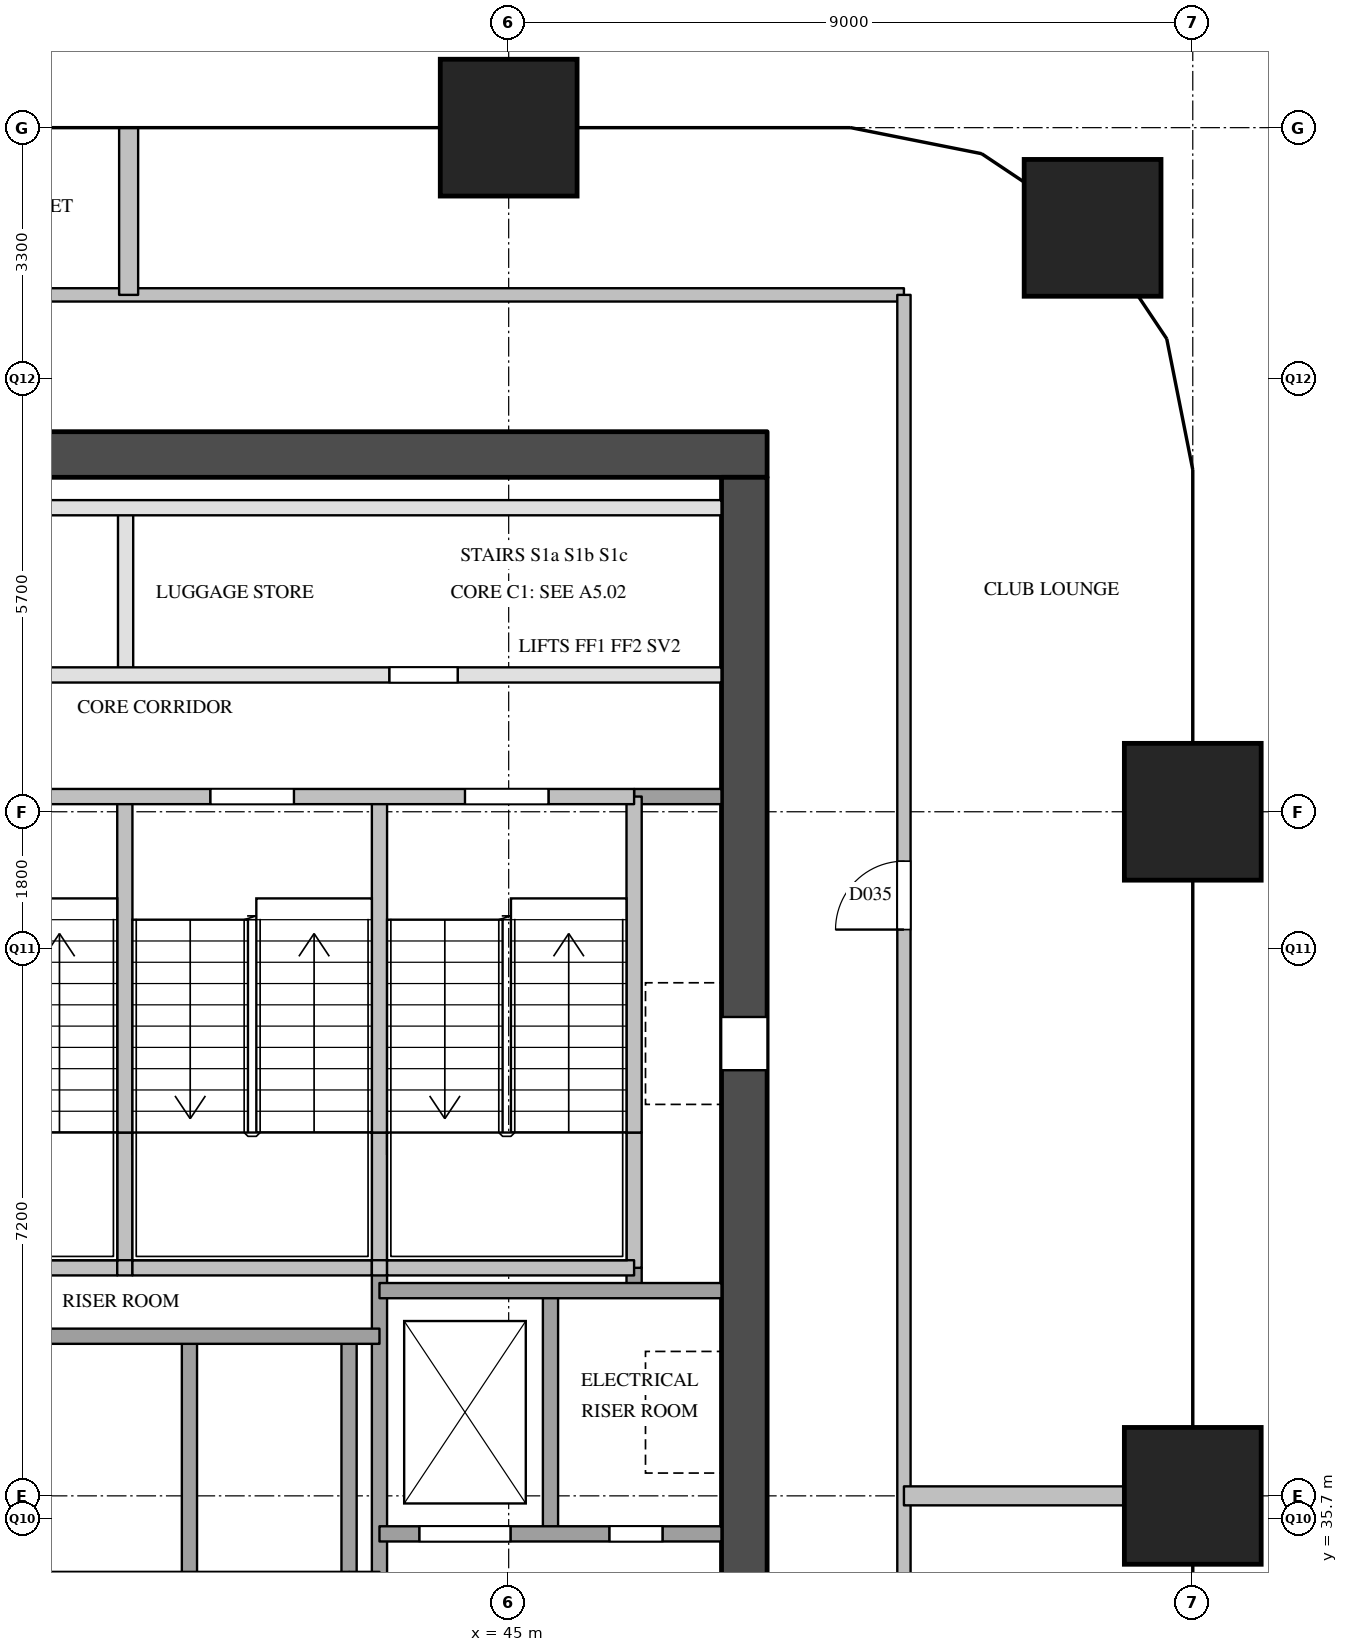
"""IFC4 building model, lengths in metres.
Left out: names, types, materials, properties, quantities, classifications, styles, units other than length and angle.
Written with IfcOpenShell. Run it as: python <this file> out.ifc"""

import sys

from ifc_helpers import new_model, si_unit, direction, frame, frame_2d, origin, origin_2d, place, context, subcontext, project, spatial, rectangle, extrude, element, fill, save


model = new_model("IFC4")
c1 = context("Model", 3, precision=1e-05, world=origin(), true_north=direction((0.0, 1.0)))
c2 = subcontext(c1, "Body", "Model", "MODEL_VIEW")
j1 = project(units=[si_unit("LENGTHUNIT", "METRE"), si_unit("PLANEANGLEUNIT", "RADIAN")], contexts=[c1])
p1 = place(None, origin())
s1 = spatial("IfcSite", under=j1, at=p1, CompositionType="ELEMENT")
p2 = place(p1, origin())
s2 = spatial("IfcBuilding", under=s1, at=p2, CompositionType="ELEMENT")
p3 = place(p2, frame((0.0, 0.0, 34.8)))
s3 = spatial("IfcBuildingStorey", under=s2, at=p3, CompositionType="ELEMENT", Elevation=34.8)
for number, where, z_axis, x_axis in (
    (1, (45.0, 54.0, 0.0), (0.0, 0.0, 1.0), (1.0, 0.0, 0.0)),
    (2, (54.0, 36.0, 0.0), (0.0, 0.0, 1.0), (1.0, 0.0, 0.0)),
    (3, (54.0, 45.0, 0.0), (0.0, 0.0, 1.0), (1.0, 0.0, 0.0)),
    (4, (52.682, 52.682, 0.0), (0.0, 0.0, 1.0), (1.0, 0.0, 0.0)),
):
    element("IfcColumn", number, at=place(p3, frame(where, z_axis=z_axis, x_axis=x_axis)), inside=s3, PredefinedType="COLUMN", context=c2, shape_type="SweptSolid", body=[
        extrude(rectangle(XDim=1.8, YDim=1.8, at=origin_2d()), origin(), (0.0, 0.0, 1.0), 3.8),
    ])
p4 = place(p3, frame((36.0, 49.7, 0.0), z_axis=(0.0, 0.0, 1.0), x_axis=(1.0, 0.0, 0.0)))
e5 = element("IfcWall", 5, at=p4, inside=s3, PredefinedType="SHEAR", context=c2, shape_type="SweptSolid", body=[
    extrude(rectangle(XDim=12.4, YDim=0.6, at=frame_2d((6.2, 0.0))), origin(), (0.0, 0.0, 1.0), 3.5),
])
p5 = place(p3, frame((48.1, 29.1, 0.0), z_axis=(0.0, 0.0, 1.0), x_axis=(0.0, 1.0, 0.0)))
e6 = element("IfcWall", 6, at=p5, inside=s3, PredefinedType="SHEAR", context=c2, shape_type="SweptSolid", body=[
    extrude(rectangle(XDim=20.3, YDim=0.6, at=frame_2d((10.15, 0.0))), origin(), (0.0, 0.0, 1.0), 3.5),
])
p6 = place(p5, frame((12.5, 0.0, 0.0)))
e7 = element("IfcOpeningElement", 7, at=p6, cuts=e6, PredefinedType="OPENING", context=c2, shape_type="SweptSolid", body=[
    extrude(rectangle(XDim=0.7, YDim=2.1, at=frame_2d((0.35, 1.05))), frame((0.0, 0.31, 0.0), z_axis=(0.0, -1.0, 0.0), x_axis=(1.0, 0.0, 0.0)), (0.0, 0.0, 1.0), 0.62),
])
p7 = place(p5, frame((3.9, 0.0, 0.0)))
e8 = element("IfcOpeningElement", 8, at=p7, cuts=e6, PredefinedType="OPENING", context=c2, shape_type="SweptSolid", body=[
    extrude(rectangle(XDim=1.8, YDim=2.1, at=frame_2d((0.9, 1.05))), frame((0.0, 0.31, 0.0), z_axis=(0.0, -1.0, 0.0), x_axis=(1.0, 0.0, 0.0)), (0.0, 0.0, 1.0), 0.62),
])
p8 = place(p3, frame((39.95, 39.0, 0.0), z_axis=(0.0, 0.0, 1.0), x_axis=(0.0, 1.0, 0.0)))
e9 = element("IfcWall", 9, at=p8, inside=s3, PredefinedType="SOLIDWALL", context=c2, shape_type="SweptSolid", body=[
    extrude(rectangle(XDim=1.78, YDim=0.2, at=frame_2d((0.89, 0.0))), origin(), (0.0, 0.0, 1.0), 3.5),
])
p9 = place(p3, frame((39.95, 40.78, 0.0), z_axis=(0.0, 0.0, 1.0), x_axis=(0.0, 1.0, 0.0)))
e10 = element("IfcWall", 10, at=p9, inside=s3, PredefinedType="SOLIDWALL", context=c2, shape_type="SweptSolid", body=[
    extrude(rectangle(XDim=4.42, YDim=0.2, at=frame_2d((2.21, 0.0))), origin(), (0.0, 0.0, 1.0), 3.5),
])
p10 = place(p3, frame((39.96, 46.8, 0.0), z_axis=(0.0, 0.0, 1.0), x_axis=(0.0, 1.0, 0.0)))
e11 = element("IfcWall", 11, at=p10, inside=s3, PredefinedType="PARTITIONING", context=c2, shape_type="SweptSolid", body=[
    extrude(rectangle(XDim=2.2, YDim=0.2, at=frame_2d((1.1, 0.0))), origin(), (0.0, 0.0, 1.0), 3.5),
])
for number, where, z_axis, x_axis in (
    (12, (40.8, 34.9, 0.0), (0.0, 0.0, 1.0), (0.0, 1.0, 0.0)),
    (13, (42.9, 34.9, 0.0), (0.0, 0.0, 1.0), (0.0, 1.0, 0.0)),
):
    element("IfcWall", number, at=place(p3, frame(where, z_axis=z_axis, x_axis=x_axis)), inside=s3, PredefinedType="SOLIDWALL", context=c2, shape_type="SweptSolid", body=[
        extrude(rectangle(XDim=3.2, YDim=0.2, at=frame_2d((1.6, 0.0))), origin(), (0.0, 0.0, 1.0), 3.5),
    ])
p11 = place(p3, frame((43.3, 29.1, 0.0), z_axis=(0.0, 0.0, 1.0), x_axis=(0.0, 1.0, 0.0)))
e14 = element("IfcWall", 14, at=p11, inside=s3, PredefinedType="SOLIDWALL", context=c2, shape_type="SweptSolid", body=[
    extrude(rectangle(XDim=9.9, YDim=0.2, at=frame_2d((4.95, 0.0))), origin(), (0.0, 0.0, 1.0), 3.5),
])
p12 = place(p3, frame((43.3, 39.0, 0.0), z_axis=(0.0, 0.0, 1.0), x_axis=(0.0, 1.0, 0.0)))
e15 = element("IfcWall", 15, at=p12, inside=s3, PredefinedType="SOLIDWALL", context=c2, shape_type="SweptSolid", body=[
    extrude(rectangle(XDim=1.78, YDim=0.2, at=frame_2d((0.89, 0.0))), origin(), (0.0, 0.0, 1.0), 3.5),
])
p13 = place(p3, frame((43.3, 40.78, 0.0), z_axis=(0.0, 0.0, 1.0), x_axis=(0.0, 1.0, 0.0)))
e16 = element("IfcWall", 16, at=p13, inside=s3, PredefinedType="SOLIDWALL", context=c2, shape_type="SweptSolid", body=[
    extrude(rectangle(XDim=4.42, YDim=0.2, at=frame_2d((2.21, 0.0))), origin(), (0.0, 0.0, 1.0), 3.5),
])
p14 = place(p3, frame((45.55, 35.5, 0.0), z_axis=(0.0, 0.0, 1.0), x_axis=(0.0, 1.0, 0.0)))
e17 = element("IfcWall", 17, at=p14, inside=s3, PredefinedType="SOLIDWALL", context=c2, shape_type="SweptSolid", body=[
    extrude(rectangle(XDim=3.2, YDim=0.2, at=frame_2d((1.6, 0.0))), origin(), (0.0, 0.0, 1.0), 3.5),
])
p15 = place(p3, frame((46.65, 38.7, 0.0), z_axis=(0.0, 0.0, 1.0), x_axis=(0.0, 1.0, 0.0)))
e18 = element("IfcWall", 18, at=p15, inside=s3, PredefinedType="SOLIDWALL", context=c2, shape_type="SweptSolid", body=[
    extrude(rectangle(XDim=0.3, YDim=0.2, at=frame_2d((0.15, 0.0))), origin(), (0.0, 0.0, 1.0), 3.5),
])
p16 = place(p3, frame((46.65, 39.0, 0.0), z_axis=(0.0, 0.0, 1.0), x_axis=(0.0, 1.0, 0.0)))
e19 = element("IfcWall", 19, at=p16, inside=s3, PredefinedType="SOLIDWALL", context=c2, shape_type="SweptSolid", body=[
    extrude(rectangle(XDim=1.78, YDim=0.2, at=frame_2d((0.89, 0.0))), origin(), (0.0, 0.0, 1.0), 3.5),
])
p17 = place(p3, frame((46.65, 40.78, 0.0), z_axis=(0.0, 0.0, 1.0), x_axis=(0.0, 1.0, 0.0)))
e20 = element("IfcWall", 20, at=p17, inside=s3, PredefinedType="SOLIDWALL", context=c2, shape_type="SweptSolid", body=[
    extrude(rectangle(XDim=4.42, YDim=0.2, at=frame_2d((2.21, 0.0))), origin(), (0.0, 0.0, 1.0), 3.5),
])
p18 = place(p3, frame((43.3, 35.5, 0.0), z_axis=(0.0, 0.0, 1.0), x_axis=(1.0, 0.0, 0.0)))
e21 = element("IfcWall", 21, at=p18, inside=s3, PredefinedType="SOLIDWALL", context=c2, shape_type="SweptSolid", body=[
    extrude(rectangle(XDim=4.5, YDim=0.2, at=frame_2d((2.25, 0.0))), origin(), (0.0, 0.0, 1.0), 3.5),
])
p19 = place(p18, frame((0.525, 0.0, 0.0)))
e22 = element("IfcOpeningElement", 22, at=p19, cuts=e21, PredefinedType="OPENING", context=c2, shape_type="SweptSolid", body=[
    extrude(rectangle(XDim=1.2, YDim=2.1, at=frame_2d((0.6, 1.05))), frame((0.0, 0.11, 0.0), z_axis=(0.0, -1.0, 0.0), x_axis=(1.0, 0.0, 0.0)), (0.0, 0.0, 1.0), 0.22),
])
p20 = place(p18, frame((3.025, 0.0, 0.0)))
e23 = element("IfcOpeningElement", 23, at=p20, cuts=e21, PredefinedType="OPENING", context=c2, shape_type="SweptSolid", body=[
    extrude(rectangle(XDim=0.7, YDim=2.1, at=frame_2d((0.35, 1.05))), frame((0.0, 0.11, 0.0), z_axis=(0.0, -1.0, 0.0), x_axis=(1.0, 0.0, 0.0)), (0.0, 0.0, 1.0), 0.22),
])
p21 = place(p3, frame((36.6, 38.1, 0.0), z_axis=(0.0, 0.0, 1.0), x_axis=(1.0, 0.0, 0.0)))
e24 = element("IfcWall", 24, at=p21, inside=s3, PredefinedType="SOLIDWALL", context=c2, shape_type="SweptSolid", body=[
    extrude(rectangle(XDim=6.7, YDim=0.2, at=frame_2d((3.35, 0.0))), origin(), (0.0, 0.0, 1.0), 3.5),
])
p22 = place(p3, frame((43.3, 38.7, 0.0), z_axis=(0.0, 0.0, 1.0), x_axis=(1.0, 0.0, 0.0)))
e25 = element("IfcWall", 25, at=p22, inside=s3, PredefinedType="SOLIDWALL", context=c2, shape_type="SweptSolid", body=[
    extrude(rectangle(XDim=4.5, YDim=0.2, at=frame_2d((2.25, 0.0))), origin(), (0.0, 0.0, 1.0), 3.5),
])
p23 = place(p3, frame((36.6, 39.0, 0.0), z_axis=(0.0, 0.0, 1.0), x_axis=(1.0, 0.0, 0.0)))
e26 = element("IfcWall", 26, at=p23, inside=s3, PredefinedType="SOLIDWALL", context=c2, shape_type="SweptSolid", body=[
    extrude(rectangle(XDim=3.25, YDim=0.2, at=frame_2d((1.625, 0.0))), origin(), (0.0, 0.0, 1.0), 3.5),
])
p24 = place(p3, frame((39.85, 39.0, 0.0), z_axis=(0.0, 0.0, 1.0), x_axis=(1.0, 0.0, 0.0)))
e27 = element("IfcWall", 27, at=p24, inside=s3, PredefinedType="SOLIDWALL", context=c2, shape_type="SweptSolid", body=[
    extrude(rectangle(XDim=0.2, YDim=0.2, at=frame_2d((0.1, 0.0))), origin(), (0.0, 0.0, 1.0), 3.5),
])
p25 = place(p3, frame((40.05, 39.0, 0.0), z_axis=(0.0, 0.0, 1.0), x_axis=(1.0, 0.0, 0.0)))
e28 = element("IfcWall", 28, at=p25, inside=s3, PredefinedType="SOLIDWALL", context=c2, shape_type="SweptSolid", body=[
    extrude(rectangle(XDim=3.15, YDim=0.2, at=frame_2d((1.575, 0.0))), origin(), (0.0, 0.0, 1.0), 3.5),
])
p26 = place(p3, frame((43.2, 39.0, 0.0), z_axis=(0.0, 0.0, 1.0), x_axis=(1.0, 0.0, 0.0)))
e29 = element("IfcWall", 29, at=p26, inside=s3, PredefinedType="SOLIDWALL", context=c2, shape_type="SweptSolid", body=[
    extrude(rectangle(XDim=0.2, YDim=0.2, at=frame_2d((0.1, 0.0))), origin(), (0.0, 0.0, 1.0), 3.5),
])
p27 = place(p3, frame((43.4, 39.0, 0.0), z_axis=(0.0, 0.0, 1.0), x_axis=(1.0, 0.0, 0.0)))
e30 = element("IfcWall", 30, at=p27, inside=s3, PredefinedType="SOLIDWALL", context=c2, shape_type="SweptSolid", body=[
    extrude(rectangle(XDim=3.25, YDim=0.2, at=frame_2d((1.625, 0.0))), origin(), (0.0, 0.0, 1.0), 3.5),
])
p28 = place(p3, frame((46.65, 45.2, 0.0), z_axis=(0.0, 0.0, 1.0), x_axis=(1.0, 0.0, 0.0)))
e31 = element("IfcWall", 31, at=p28, inside=s3, PredefinedType="SOLIDWALL", context=c2, shape_type="SweptSolid", body=[
    extrude(rectangle(XDim=1.15, YDim=0.2, at=frame_2d((0.575, 0.0))), origin(), (0.0, 0.0, 1.0), 3.5),
])
p29 = place(p3, frame((36.6, 45.2, 0.0), z_axis=(0.0, 0.0, 1.0), x_axis=(1.0, 0.0, 0.0)))
e32 = element("IfcWall", 32, at=p29, inside=s3, PredefinedType="SOLIDWALL", context=c2, shape_type="SweptSolid", body=[
    extrude(rectangle(XDim=10.05, YDim=0.2, at=frame_2d((5.025, 0.0))), origin(), (0.0, 0.0, 1.0), 3.5),
])
p30 = place(p29, frame((1.125, 0.0, 0.0)))
e33 = element("IfcOpeningElement", 33, at=p30, cuts=e32, PredefinedType="OPENING", context=c2, shape_type="SweptSolid", body=[
    extrude(rectangle(XDim=1.1, YDim=2.1, at=frame_2d((0.55, 1.05))), frame((0.0, 0.11, 0.0), z_axis=(0.0, -1.0, 0.0), x_axis=(1.0, 0.0, 0.0)), (0.0, 0.0, 1.0), 0.22),
])
p31 = place(p29, frame((4.475, 0.0, 0.0)))
e34 = element("IfcOpeningElement", 34, at=p31, cuts=e32, PredefinedType="OPENING", context=c2, shape_type="SweptSolid", body=[
    extrude(rectangle(XDim=1.1, YDim=2.1, at=frame_2d((0.55, 1.05))), frame((0.0, 0.11, 0.0), z_axis=(0.0, -1.0, 0.0), x_axis=(1.0, 0.0, 0.0)), (0.0, 0.0, 1.0), 0.22),
])
p32 = place(p29, frame((7.825, 0.0, 0.0)))
e35 = element("IfcOpeningElement", 35, at=p32, cuts=e32, PredefinedType="OPENING", context=c2, shape_type="SweptSolid", body=[
    extrude(rectangle(XDim=1.1, YDim=2.1, at=frame_2d((0.55, 1.05))), frame((0.0, 0.11, 0.0), z_axis=(0.0, -1.0, 0.0), x_axis=(1.0, 0.0, 0.0)), (0.0, 0.0, 1.0), 0.22),
])
p33 = place(p3, frame((36.6, 46.8, 0.0), z_axis=(0.0, 0.0, 1.0), x_axis=(1.0, 0.0, 0.0)))
e36 = element("IfcWall", 36, at=p33, inside=s3, PredefinedType="PARTITIONING", context=c2, shape_type="SweptSolid", body=[
    extrude(rectangle(XDim=11.2, YDim=0.2, at=frame_2d((5.6, 0.0))), origin(), (0.0, 0.0, 1.0), 3.5),
])
p34 = place(p33, frame((1.23, 0.0, 0.0)))
e37 = element("IfcOpeningElement", 37, at=p34, cuts=e36, PredefinedType="OPENING", context=c2, shape_type="SweptSolid", body=[
    extrude(rectangle(XDim=0.9, YDim=2.1, at=frame_2d((0.45, 1.05))), frame((0.0, 0.11, 0.0), z_axis=(0.0, -1.0, 0.0), x_axis=(1.0, 0.0, 0.0)), (0.0, 0.0, 1.0), 0.22),
])
p35 = place(p33, frame((6.83, 0.0, 0.0)))
e38 = element("IfcOpeningElement", 38, at=p35, cuts=e36, PredefinedType="OPENING", context=c2, shape_type="SweptSolid", body=[
    extrude(rectangle(XDim=0.9, YDim=2.1, at=frame_2d((0.45, 1.05))), frame((0.0, 0.11, 0.0), z_axis=(0.0, -1.0, 0.0), x_axis=(1.0, 0.0, 0.0)), (0.0, 0.0, 1.0), 0.22),
])
p36 = place(p3, frame((36.6, 49.0, 0.0), z_axis=(0.0, 0.0, 1.0), x_axis=(1.0, 0.0, 0.0)))
e39 = element("IfcWall", 39, at=p36, inside=s3, PredefinedType="PARTITIONING", context=c2, shape_type="SweptSolid", body=[
    extrude(rectangle(XDim=11.2, YDim=0.2, at=frame_2d((5.6, 0.0))), origin(), (0.0, 0.0, 1.0), 3.5),
])
p37 = place(p3, frame((34.2, 51.8, 0.0), z_axis=(0.0, 0.0, 1.0), x_axis=(1.0, 0.0, 0.0)))
e40 = element("IfcWall", 40, at=p37, inside=s3, PredefinedType="PARTITIONING", context=c2, shape_type="SweptSolid", body=[
    extrude(rectangle(XDim=16.0, YDim=0.175, at=frame_2d((8.0, 0.0))), origin(), (0.0, 0.0, 1.0), 3.5),
])
p38 = place(p37, frame((3.3, 0.0, 0.0)))
e41 = element("IfcOpeningElement", 41, at=p38, cuts=e40, PredefinedType="OPENING", context=c2, shape_type="SweptSolid", body=[
    extrude(rectangle(XDim=1.0, YDim=2.1, at=frame_2d((0.5, 1.05))), frame((0.0, 0.097, 0.0), z_axis=(0.0, -1.0, 0.0), x_axis=(1.0, 0.0, 0.0)), (0.0, 0.0, 1.0), 0.195),
])
p39 = place(p3, frame((50.2, 26.7, 0.0), z_axis=(0.0, 0.0, 1.0), x_axis=(0.0, 1.0, 0.0)))
e42 = element("IfcWall", 42, at=p39, inside=s3, PredefinedType="PARTITIONING", context=c2, shape_type="SweptSolid", body=[
    extrude(rectangle(XDim=25.1, YDim=0.175, at=frame_2d((12.55, 0.0))), origin(), (0.0, 0.0, 1.0), 2.5),
])
p40 = place(p39, frame((2.2, 0.0, 0.0)))
e43 = element("IfcOpeningElement", 43, at=p40, cuts=e42, PredefinedType="OPENING", context=c2, shape_type="SweptSolid", body=[
    extrude(rectangle(XDim=0.9, YDim=2.1, at=frame_2d((0.45, 1.05))), frame((0.0, 0.097, 0.0), z_axis=(0.0, -1.0, 0.0), x_axis=(1.0, 0.0, 0.0)), (0.0, 0.0, 1.0), 0.195),
])
p41 = place(p39, frame((6.85, 0.0, 0.0)))
e44 = element("IfcOpeningElement", 44, at=p41, cuts=e42, PredefinedType="OPENING", context=c2, shape_type="SweptSolid", body=[
    extrude(rectangle(XDim=0.9, YDim=2.1, at=frame_2d((0.45, 1.05))), frame((0.0, 0.097, 0.0), z_axis=(0.0, -1.0, 0.0), x_axis=(1.0, 0.0, 0.0)), (0.0, 0.0, 1.0), 0.195),
])
p42 = place(p39, frame((16.75, 0.0, 0.0)))
e45 = element("IfcOpeningElement", 45, at=p42, cuts=e42, PredefinedType="OPENING", context=c2, shape_type="SweptSolid", body=[
    extrude(rectangle(XDim=0.9, YDim=2.1, at=frame_2d((0.45, 1.05))), frame((0.0, 0.097, 0.0), z_axis=(0.0, -1.0, 0.0), x_axis=(1.0, 0.0, 0.0)), (0.0, 0.0, 1.0), 0.195),
])
p43 = place(p3, frame((50.2, 36.0, 0.0), z_axis=(0.0, 0.0, 1.0), x_axis=(1.0, 0.0, 0.0)))
e46 = element("IfcWall", 46, at=p43, inside=s3, PredefinedType="PARTITIONING", context=c2, shape_type="SweptSolid", body=[
    extrude(rectangle(XDim=3.8, YDim=0.25, at=frame_2d((1.9, 0.0))), origin(), (0.0, 0.0, 1.0), 3.5),
])
p44 = place(p3, frame((40.0, 51.8, 0.0), z_axis=(0.0, 0.0, 1.0), x_axis=(0.0, 1.0, 0.0)))
e47 = element("IfcWall", 47, at=p44, inside=s3, PredefinedType="PARTITIONING", context=c2, shape_type="SweptSolid", body=[
    extrude(rectangle(XDim=2.2, YDim=0.25, at=frame_2d((1.1, 0.0))), origin(), (0.0, 0.0, 1.0), 2.5),
])
p45 = place(p19, origin())
e48 = element("IfcDoor", 48, at=p45, inside=s3, OperationType="SLIDING_TO_LEFT", PredefinedType="DOOR", context=c2, shape_type="SweptSolid", body=[
    extrude(rectangle(XDim=1.2, YDim=2.1, at=frame_2d((0.6, 1.05))), frame((0.0, 0.025, 0.0), z_axis=(0.0, -1.0, 0.0), x_axis=(1.0, 0.0, 0.0)), (0.0, 0.0, 1.0), 0.05),
])
fill(e22, e48)
p46 = place(p31, origin())
e49 = element("IfcDoor", 49, at=p46, inside=s3, OperationType="SINGLE_SWING_RIGHT", PredefinedType="DOOR", context=c2, shape_type="SweptSolid", body=[
    extrude(rectangle(XDim=1.1, YDim=2.1, at=frame_2d((0.55, 1.05))), frame((0.0, 0.025, 0.0), z_axis=(0.0, -1.0, 0.0), x_axis=(1.0, 0.0, 0.0)), (0.0, 0.0, 1.0), 0.05),
])
fill(e34, e49)
p47 = place(p32, origin())
e50 = element("IfcDoor", 50, at=p47, inside=s3, OperationType="SINGLE_SWING_RIGHT", PredefinedType="DOOR", context=c2, shape_type="SweptSolid", body=[
    extrude(rectangle(XDim=1.1, YDim=2.1, at=frame_2d((0.55, 1.05))), frame((0.0, 0.025, 0.0), z_axis=(0.0, -1.0, 0.0), x_axis=(1.0, 0.0, 0.0)), (0.0, 0.0, 1.0), 0.05),
])
fill(e35, e50)
p48 = place(p6, origin())
e51 = element("IfcDoor", 51, at=p48, inside=s3, OperationType="SINGLE_SWING_RIGHT", PredefinedType="DOOR", context=c2, shape_type="SweptSolid", body=[
    extrude(rectangle(XDim=0.7, YDim=2.1, at=frame_2d((0.35, 1.05))), frame((0.0, 0.025, 0.0), z_axis=(0.0, -1.0, 0.0), x_axis=(1.0, 0.0, 0.0)), (0.0, 0.0, 1.0), 0.05),
])
fill(e7, e51)
p49 = place(p20, origin())
e52 = element("IfcDoor", 52, at=p49, inside=s3, OperationType="SINGLE_SWING_RIGHT", PredefinedType="DOOR", context=c2, shape_type="SweptSolid", body=[
    extrude(rectangle(XDim=0.7, YDim=2.1, at=frame_2d((0.35, 1.05))), frame((0.0, 0.025, 0.0), z_axis=(0.0, -1.0, 0.0), x_axis=(1.0, 0.0, 0.0)), (0.0, 0.0, 1.0), 0.05),
])
fill(e23, e52)
p50 = place(p35, origin())
e53 = element("IfcDoor", 53, at=p50, inside=s3, OperationType="SINGLE_SWING_RIGHT", PredefinedType="DOOR", context=c2, shape_type="SweptSolid", body=[
    extrude(rectangle(XDim=0.9, YDim=2.1, at=frame_2d((0.45, 1.05))), frame((0.0, 0.025, 0.0), z_axis=(0.0, -1.0, 0.0), x_axis=(1.0, 0.0, 0.0)), (0.0, 0.0, 1.0), 0.05),
])
fill(e38, e53)
p51 = place(p42, origin())
e54 = element("IfcDoor", 54, at=p51, inside=s3, OperationType="SINGLE_SWING_LEFT", PredefinedType="DOOR", context=c2, shape_type="SweptSolid", body=[
    extrude(rectangle(XDim=0.9, YDim=2.1, at=frame_2d((0.45, 1.05))), frame((0.0, 0.025, 0.0), z_axis=(0.0, -1.0, 0.0), x_axis=(1.0, 0.0, 0.0)), (0.0, 0.0, 1.0), 0.05),
])
fill(e45, e54)
save(model, sys.argv[1])
